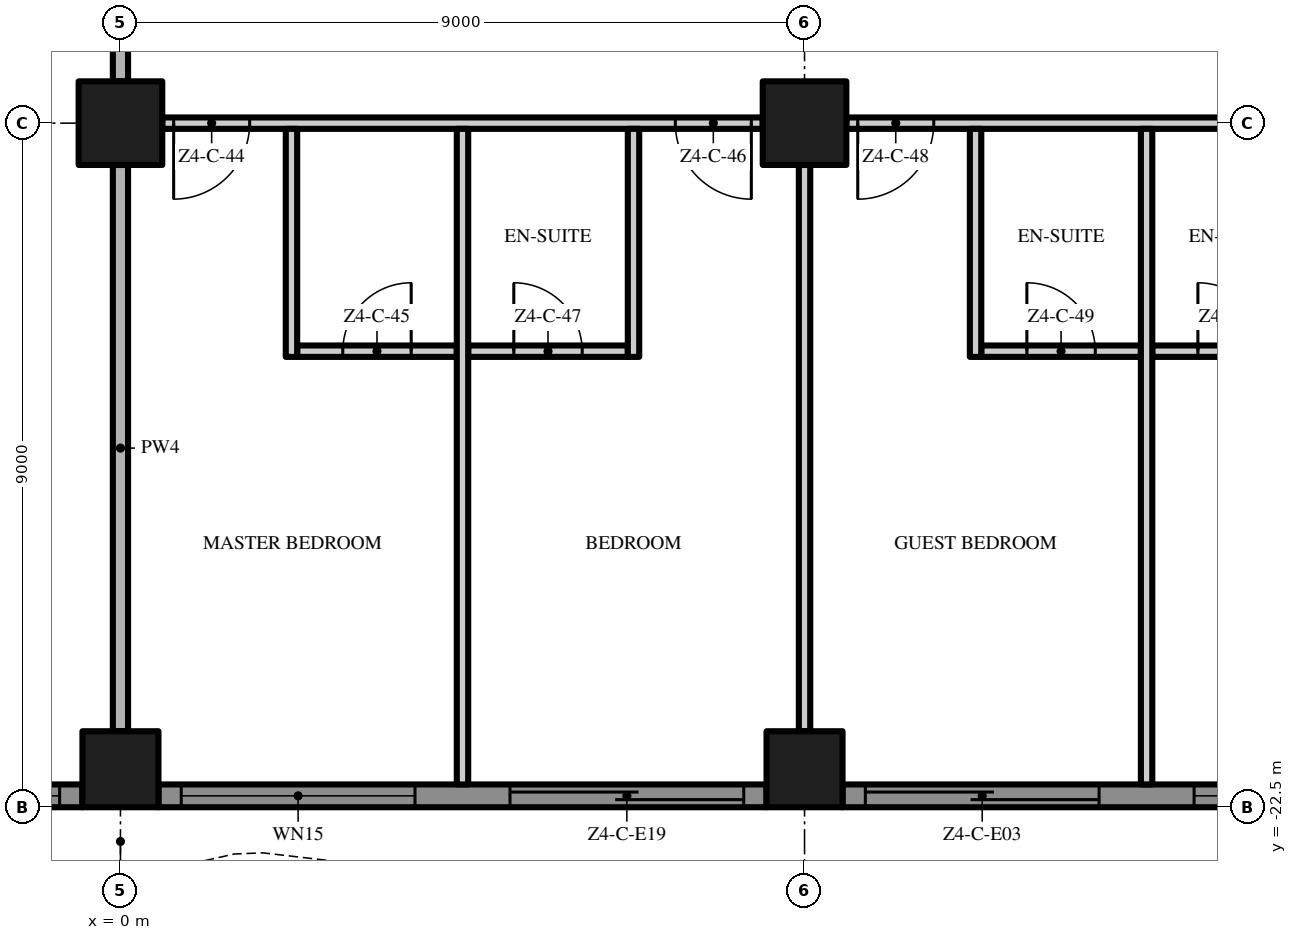
"""IFC4 building model, lengths in metres.
Left out: names, types, materials, properties, quantities, classifications, styles, units other than length and angle.
Written with IfcOpenShell. Run it as: python <this file> out.ifc"""

import sys

from ifc_helpers import new_model, si_unit, direction, frame, frame_2d, origin, origin_2d, place, context, subcontext, project, spatial, polyline, rectangle, outline, extrude, element, fill, save


model = new_model("IFC4")
c1 = context("Model", 3, precision=1e-05, world=origin(), true_north=direction((0.0, 1.0)))
c2 = subcontext(c1, "Body", "Model", "MODEL_VIEW")
j1 = project(units=[si_unit("LENGTHUNIT", "METRE"), si_unit("PLANEANGLEUNIT", "RADIAN")], contexts=[c1])
p1 = place(None, origin())
s1 = spatial("IfcSite", under=j1, at=p1, CompositionType="ELEMENT")
p2 = place(p1, origin())
s2 = spatial("IfcBuilding", under=s1, at=p2, CompositionType="ELEMENT")
p3 = place(p2, frame((0.0, 0.0, 214.8)))
s3 = spatial("IfcBuildingStorey", under=s2, at=p3, CompositionType="ELEMENT", Elevation=214.8)
p4 = place(p3, frame((0.0, -13.5, 0.0), z_axis=(0.0, 0.0, 1.0), x_axis=(1.0, 0.0, 0.0)))
e1 = element("IfcColumn", 1, at=p4, inside=s3, PredefinedType="COLUMN", context=c2, shape_type="SweptSolid", body=[
    extrude(rectangle(XDim=1.1, YDim=1.1, at=origin_2d()), origin(), (0.0, 0.0, 1.0), 3.5),
])
p5 = place(p3, frame((0.0, -22.0, 0.0), z_axis=(0.0, 0.0, 1.0), x_axis=(1.0, 0.0, 0.0)))
e2 = element("IfcColumn", 2, at=p5, inside=s3, PredefinedType="COLUMN", context=c2, shape_type="SweptSolid", body=[
    extrude(rectangle(XDim=1.0, YDim=1.0, at=origin_2d()), origin(), (0.0, 0.0, 1.0), 3.5),
])
p6 = place(p3, frame((9.0, -13.5, 0.0), z_axis=(0.0, 0.0, 1.0), x_axis=(1.0, 0.0, 0.0)))
e3 = element("IfcColumn", 3, at=p6, inside=s3, PredefinedType="COLUMN", context=c2, shape_type="SweptSolid", body=[
    extrude(rectangle(XDim=1.1, YDim=1.1, at=origin_2d()), origin(), (0.0, 0.0, 1.0), 3.5),
])
p7 = place(p3, frame((9.0, -22.0, 0.0), z_axis=(0.0, 0.0, 1.0), x_axis=(1.0, 0.0, 0.0)))
e4 = element("IfcColumn", 4, at=p7, inside=s3, PredefinedType="COLUMN", context=c2, shape_type="SweptSolid", body=[
    extrude(rectangle(XDim=1.0, YDim=1.0, at=origin_2d()), origin(), (0.0, 0.0, 1.0), 3.5),
])
p8 = place(p3, frame((-0.5, -22.35, 0.0), z_axis=(0.0, 0.0, 1.0), x_axis=(-1.0, 0.0, 0.0)))
e5 = element("IfcWall", 5, at=p8, inside=s3, PredefinedType="SOLIDWALL", context=c2, shape_type="SweptSolid", body=[
    extrude(rectangle(XDim=8.0, YDim=0.3, at=frame_2d((4.0, 0.0))), origin(), (0.0, 0.0, 1.0), 3.5),
])
p9 = place(p8, frame((4.625, 0.0, 0.0)))
e6 = element("IfcOpeningElement", 6, at=p9, cuts=e5, PredefinedType="OPENING", context=c2, shape_type="SweptSolid", body=[
    extrude(rectangle(XDim=3.075, YDim=2.4, at=frame_2d((1.538, 1.2))), frame((0.0, 0.16, 0.0), z_axis=(0.0, -1.0, 0.0), x_axis=(1.0, 0.0, 0.0)), (0.0, 0.0, 1.0), 0.32),
])
p10 = place(p8, frame((0.3, 0.0, 0.45)))
e7 = element("IfcOpeningElement", 7, at=p10, cuts=e5, PredefinedType="OPENING", context=c2, shape_type="SweptSolid", body=[
    extrude(rectangle(XDim=3.075, YDim=2.65, at=frame_2d((1.538, 1.325))), frame((0.0, 0.16, 0.0), z_axis=(0.0, -1.0, 0.0), x_axis=(1.0, 0.0, 0.0)), (0.0, 0.0, 1.0), 0.32),
])
p11 = place(p3, frame((8.5, -22.35, 0.0), z_axis=(0.0, 0.0, 1.0), x_axis=(-1.0, 0.0, 0.0)))
e8 = element("IfcWall", 8, at=p11, inside=s3, PredefinedType="SOLIDWALL", context=c2, shape_type="SweptSolid", body=[
    extrude(rectangle(XDim=8.0, YDim=0.3, at=frame_2d((4.0, 0.0))), origin(), (0.0, 0.0, 1.0), 3.5),
])
p12 = place(p11, frame((4.625, 0.0, 0.45)))
e9 = element("IfcOpeningElement", 9, at=p12, cuts=e8, PredefinedType="OPENING", context=c2, shape_type="SweptSolid", body=[
    extrude(rectangle(XDim=3.075, YDim=2.65, at=frame_2d((1.538, 1.325))), frame((0.0, 0.16, 0.0), z_axis=(0.0, -1.0, 0.0), x_axis=(1.0, 0.0, 0.0)), (0.0, 0.0, 1.0), 0.32),
])
p13 = place(p11, frame((0.3, 0.0, 0.0)))
e10 = element("IfcOpeningElement", 10, at=p13, cuts=e8, PredefinedType="OPENING", context=c2, shape_type="SweptSolid", body=[
    extrude(rectangle(XDim=3.075, YDim=2.4, at=frame_2d((1.538, 1.2))), frame((0.0, 0.16, 0.0), z_axis=(0.0, -1.0, 0.0), x_axis=(1.0, 0.0, 0.0)), (0.0, 0.0, 1.0), 0.32),
])
p14 = place(p3, frame((17.5, -22.35, 0.0), z_axis=(0.0, 0.0, 1.0), x_axis=(-1.0, 0.0, 0.0)))
e11 = element("IfcWall", 11, at=p14, inside=s3, PredefinedType="SOLIDWALL", context=c2, shape_type="SweptSolid", body=[
    extrude(rectangle(XDim=8.0, YDim=0.3, at=frame_2d((4.0, 0.0))), origin(), (0.0, 0.0, 1.0), 3.5),
])
p15 = place(p14, frame((4.625, 0.0, 0.0)))
e12 = element("IfcOpeningElement", 12, at=p15, cuts=e11, PredefinedType="OPENING", context=c2, shape_type="SweptSolid", body=[
    extrude(rectangle(XDim=3.075, YDim=2.4, at=frame_2d((1.538, 1.2))), frame((0.0, 0.16, 0.0), z_axis=(0.0, -1.0, 0.0), x_axis=(1.0, 0.0, 0.0)), (0.0, 0.0, 1.0), 0.32),
])
p16 = place(p14, frame((0.3, 0.0, 0.45)))
e13 = element("IfcOpeningElement", 13, at=p16, cuts=e11, PredefinedType="OPENING", context=c2, shape_type="SweptSolid", body=[
    extrude(rectangle(XDim=3.075, YDim=2.65, at=frame_2d((1.538, 1.325))), frame((0.0, 0.16, 0.0), z_axis=(0.0, -1.0, 0.0), x_axis=(1.0, 0.0, 0.0)), (0.0, 0.0, 1.0), 0.32),
])
p17 = place(p3, origin())
e14 = element("IfcWall", 14, at=p17, inside=s3, PredefinedType="USERDEFINED", context=c2, shape_type="SweptSolid", body=[
    extrude(outline(polyline([(-22.5, -25.149), (-21.0, -25.485), (-20.625, -25.5), (-19.5, -25.369), (-18.0, -24.845), (-16.5, -24.112), (-15.0, -23.451), (-13.5, -23.115), (-13.125, -23.1), (-12.0, -23.231), (-10.5, -23.755), (-9.0, -24.488), (-7.5, -25.149), (-6.0, -25.485), (-5.625, -25.5), (-4.5, -25.369), (-3.0, -24.845), (-1.5, -24.112), (0.0, -23.451), (1.5, -23.115), (1.875, -23.1), (3.0, -23.231), (4.5, -23.755), (6.0, -24.488), (7.5, -25.149), (9.0, -25.485), (9.375, -25.5), (10.5, -25.369), (12.0, -24.845), (13.5, -24.112), (15.0, -23.451), (16.5, -23.115), (16.875, -23.1), (18.0, -23.231), (19.5, -23.755), (21.0, -24.488), (22.5, -25.149), (22.601, -24.92), (21.105, -24.261), (19.596, -23.524), (18.056, -22.986), (16.885, -22.849), (16.467, -22.866), (14.921, -23.213), (13.395, -23.885), (11.904, -24.614), (10.444, -25.124), (9.365, -25.249), (9.033, -25.236), (7.579, -24.91), (6.105, -24.261), (4.596, -23.524), (3.056, -22.986), (1.885, -22.849), (1.467, -22.866), (-0.079, -23.213), (-1.605, -23.885), (-3.096, -24.614), (-4.556, -25.124), (-5.635, -25.249), (-5.967, -25.236), (-7.421, -24.91), (-8.895, -24.261), (-10.404, -23.524), (-11.944, -22.986), (-13.115, -22.849), (-13.533, -22.866), (-15.079, -23.213), (-16.605, -23.885), (-18.096, -24.614), (-19.556, -25.124), (-20.635, -25.249), (-20.967, -25.236), (-22.445, -24.905), (-22.5, -25.149)])), origin(), (0.0, 0.0, 1.0), 0.9),
])
p18 = place(p3, frame((2.325, -16.5, 0.0), z_axis=(0.0, 0.0, 1.0), x_axis=(1.0, 0.0, 0.0)))
e15 = element("IfcWall", 15, at=p18, inside=s3, PredefinedType="PARTITIONING", context=c2, shape_type="SweptSolid", body=[
    extrude(rectangle(XDim=2.1, YDim=0.15, at=frame_2d((1.05, 0.0))), origin(), (0.0, 0.0, 1.0), 3.5),
])
p19 = place(p18, frame((0.6, 0.0, 0.0)))
e16 = element("IfcOpeningElement", 16, at=p19, cuts=e15, PredefinedType="OPENING", context=c2, shape_type="SweptSolid", body=[
    extrude(rectangle(XDim=0.9, YDim=2.1, at=frame_2d((0.45, 1.05))), frame((0.0, 0.085, 0.0), z_axis=(0.0, -1.0, 0.0), x_axis=(1.0, 0.0, 0.0)), (0.0, 0.0, 1.0), 0.17),
])
p20 = place(p3, frame((4.575, -16.5, 0.0), z_axis=(0.0, 0.0, 1.0), x_axis=(1.0, 0.0, 0.0)))
e17 = element("IfcWall", 17, at=p20, inside=s3, PredefinedType="PARTITIONING", context=c2, shape_type="SweptSolid", body=[
    extrude(rectangle(XDim=2.1, YDim=0.15, at=frame_2d((1.05, 0.0))), origin(), (0.0, 0.0, 1.0), 3.5),
])
p21 = place(p20, frame((0.6, 0.0, 0.0)))
e18 = element("IfcOpeningElement", 18, at=p21, cuts=e17, PredefinedType="OPENING", context=c2, shape_type="SweptSolid", body=[
    extrude(rectangle(XDim=0.9, YDim=2.1, at=frame_2d((0.45, 1.05))), frame((0.0, 0.085, 0.0), z_axis=(0.0, -1.0, 0.0), x_axis=(1.0, 0.0, 0.0)), (0.0, 0.0, 1.0), 0.17),
])
p22 = place(p3, frame((11.325, -16.5, 0.0), z_axis=(0.0, 0.0, 1.0), x_axis=(1.0, 0.0, 0.0)))
e19 = element("IfcWall", 19, at=p22, inside=s3, PredefinedType="PARTITIONING", context=c2, shape_type="SweptSolid", body=[
    extrude(rectangle(XDim=2.1, YDim=0.15, at=frame_2d((1.05, 0.0))), origin(), (0.0, 0.0, 1.0), 3.5),
])
p23 = place(p22, frame((0.6, 0.0, 0.0)))
e20 = element("IfcOpeningElement", 20, at=p23, cuts=e19, PredefinedType="OPENING", context=c2, shape_type="SweptSolid", body=[
    extrude(rectangle(XDim=0.9, YDim=2.1, at=frame_2d((0.45, 1.05))), frame((0.0, 0.085, 0.0), z_axis=(0.0, -1.0, 0.0), x_axis=(1.0, 0.0, 0.0)), (0.0, 0.0, 1.0), 0.17),
])
p24 = place(p3, frame((13.575, -16.5, 0.0), z_axis=(0.0, 0.0, 1.0), x_axis=(1.0, 0.0, 0.0)))
e21 = element("IfcWall", 21, at=p24, inside=s3, PredefinedType="PARTITIONING", context=c2, shape_type="SweptSolid", body=[
    extrude(rectangle(XDim=2.1, YDim=0.15, at=frame_2d((1.05, 0.0))), origin(), (0.0, 0.0, 1.0), 3.5),
])
p25 = place(p24, frame((0.6, 0.0, 0.0)))
e22 = element("IfcOpeningElement", 22, at=p25, cuts=e21, PredefinedType="OPENING", context=c2, shape_type="SweptSolid", body=[
    extrude(rectangle(XDim=0.9, YDim=2.1, at=frame_2d((0.45, 1.05))), frame((0.0, 0.085, 0.0), z_axis=(0.0, -1.0, 0.0), x_axis=(1.0, 0.0, 0.0)), (0.0, 0.0, 1.0), 0.17),
])
p26 = place(p3, frame((8.45, -13.5, 0.0), z_axis=(0.0, 0.0, 1.0), x_axis=(-1.0, 0.0, 0.0)))
e23 = element("IfcWall", 23, at=p26, inside=s3, PredefinedType="PARTITIONING", context=c2, shape_type="SweptSolid", body=[
    extrude(rectangle(XDim=7.9, YDim=0.15, at=frame_2d((3.95, 0.0))), origin(), (0.0, 0.0, 1.0), 3.5),
])
p27 = place(p26, frame((6.75, 0.0, 0.0)))
e24 = element("IfcOpeningElement", 24, at=p27, cuts=e23, PredefinedType="OPENING", context=c2, shape_type="SweptSolid", body=[
    extrude(rectangle(XDim=1.0, YDim=2.4, at=frame_2d((0.5, 1.2))), frame((0.0, 0.085, 0.0), z_axis=(0.0, -1.0, 0.0), x_axis=(1.0, 0.0, 0.0)), (0.0, 0.0, 1.0), 0.17),
])
p28 = place(p26, frame((0.15, 0.0, 0.0)))
e25 = element("IfcOpeningElement", 25, at=p28, cuts=e23, PredefinedType="OPENING", context=c2, shape_type="SweptSolid", body=[
    extrude(rectangle(XDim=1.0, YDim=2.4, at=frame_2d((0.5, 1.2))), frame((0.0, 0.085, 0.0), z_axis=(0.0, -1.0, 0.0), x_axis=(1.0, 0.0, 0.0)), (0.0, 0.0, 1.0), 0.17),
])
p29 = place(p3, frame((17.45, -13.5, 0.0), z_axis=(0.0, 0.0, 1.0), x_axis=(-1.0, 0.0, 0.0)))
e26 = element("IfcWall", 26, at=p29, inside=s3, PredefinedType="PARTITIONING", context=c2, shape_type="SweptSolid", body=[
    extrude(rectangle(XDim=7.9, YDim=0.15, at=frame_2d((3.95, 0.0))), origin(), (0.0, 0.0, 1.0), 3.5),
])
p30 = place(p29, frame((6.75, 0.0, 0.0)))
e27 = element("IfcOpeningElement", 27, at=p30, cuts=e26, PredefinedType="OPENING", context=c2, shape_type="SweptSolid", body=[
    extrude(rectangle(XDim=1.0, YDim=2.4, at=frame_2d((0.5, 1.2))), frame((0.0, 0.085, 0.0), z_axis=(0.0, -1.0, 0.0), x_axis=(1.0, 0.0, 0.0)), (0.0, 0.0, 1.0), 0.17),
])
p31 = place(p29, frame((0.15, 0.0, 0.0)))
e28 = element("IfcOpeningElement", 28, at=p31, cuts=e26, PredefinedType="OPENING", context=c2, shape_type="SweptSolid", body=[
    extrude(rectangle(XDim=1.0, YDim=2.4, at=frame_2d((0.5, 1.2))), frame((0.0, 0.085, 0.0), z_axis=(0.0, -1.0, 0.0), x_axis=(1.0, 0.0, 0.0)), (0.0, 0.0, 1.0), 0.17),
])
p32 = place(p3, frame((0.0, -21.5, 0.0), z_axis=(0.0, 0.0, 1.0), x_axis=(0.0, 1.0, 0.0)))
e29 = element("IfcWall", 29, at=p32, inside=s3, PredefinedType="PARTITIONING", context=c2, shape_type="SweptSolid", body=[
    extrude(rectangle(XDim=7.45, YDim=0.2, at=frame_2d((3.725, 0.0))), origin(), (0.0, 0.0, 1.0), 3.5),
])
p33 = place(p3, frame((0.0, -12.95, 0.0), z_axis=(0.0, 0.0, 1.0), x_axis=(0.0, 1.0, 0.0)))
e30 = element("IfcWall", 30, at=p33, inside=s3, PredefinedType="PARTITIONING", context=c2, shape_type="SweptSolid", body=[
    extrude(rectangle(XDim=7.9, YDim=0.2, at=frame_2d((3.95, 0.0))), origin(), (0.0, 0.0, 1.0), 3.5),
])
p34 = place(p3, frame((2.25, -16.575, 0.0), z_axis=(0.0, 0.0, 1.0), x_axis=(0.0, 1.0, 0.0)))
e31 = element("IfcWall", 31, at=p34, inside=s3, PredefinedType="PARTITIONING", context=c2, shape_type="SweptSolid", body=[
    extrude(rectangle(XDim=3.0, YDim=0.15, at=frame_2d((1.5, 0.0))), origin(), (0.0, 0.0, 1.0), 3.5),
])
p35 = place(p3, frame((4.5, -22.2, 0.0), z_axis=(0.0, 0.0, 1.0), x_axis=(0.0, 1.0, 0.0)))
e32 = element("IfcWall", 32, at=p35, inside=s3, PredefinedType="PARTITIONING", context=c2, shape_type="SweptSolid", body=[
    extrude(rectangle(XDim=8.625, YDim=0.15, at=frame_2d((4.312, 0.0))), origin(), (0.0, 0.0, 1.0), 3.5),
])
p36 = place(p3, frame((6.75, -16.575, 0.0), z_axis=(0.0, 0.0, 1.0), x_axis=(0.0, 1.0, 0.0)))
e33 = element("IfcWall", 33, at=p36, inside=s3, PredefinedType="PARTITIONING", context=c2, shape_type="SweptSolid", body=[
    extrude(rectangle(XDim=3.0, YDim=0.15, at=frame_2d((1.5, 0.0))), origin(), (0.0, 0.0, 1.0), 3.5),
])
p37 = place(p3, frame((9.0, -21.5, 0.0), z_axis=(0.0, 0.0, 1.0), x_axis=(0.0, 1.0, 0.0)))
e34 = element("IfcWall", 34, at=p37, inside=s3, PredefinedType="PARTITIONING", context=c2, shape_type="SweptSolid", body=[
    extrude(rectangle(XDim=7.45, YDim=0.15, at=frame_2d((3.725, 0.0))), origin(), (0.0, 0.0, 1.0), 3.5),
])
p38 = place(p3, frame((11.25, -16.575, 0.0), z_axis=(0.0, 0.0, 1.0), x_axis=(0.0, 1.0, 0.0)))
e35 = element("IfcWall", 35, at=p38, inside=s3, PredefinedType="PARTITIONING", context=c2, shape_type="SweptSolid", body=[
    extrude(rectangle(XDim=3.0, YDim=0.15, at=frame_2d((1.5, 0.0))), origin(), (0.0, 0.0, 1.0), 3.5),
])
p39 = place(p3, frame((13.5, -22.2, 0.0), z_axis=(0.0, 0.0, 1.0), x_axis=(0.0, 1.0, 0.0)))
e36 = element("IfcWall", 36, at=p39, inside=s3, PredefinedType="PARTITIONING", context=c2, shape_type="SweptSolid", body=[
    extrude(rectangle(XDim=8.625, YDim=0.15, at=frame_2d((4.312, 0.0))), origin(), (0.0, 0.0, 1.0), 3.5),
])
p40 = place(p10, origin())
e37 = element("IfcWindow", 37, at=p40, inside=s3, PartitioningType="SINGLE_PANEL", PredefinedType="WINDOW", context=c2, shape_type="SweptSolid", body=[
    extrude(rectangle(XDim=3.075, YDim=2.65, at=frame_2d((1.538, 1.325))), frame((0.0, 0.03, 0.0), z_axis=(0.0, -1.0, 0.0), x_axis=(1.0, 0.0, 0.0)), (0.0, 0.0, 1.0), 0.06),
])
fill(e7, e37)
p41 = place(p12, origin())
e38 = element("IfcWindow", 38, at=p41, inside=s3, PartitioningType="SINGLE_PANEL", PredefinedType="WINDOW", context=c2, shape_type="SweptSolid", body=[
    extrude(rectangle(XDim=3.075, YDim=2.65, at=frame_2d((1.538, 1.325))), frame((0.0, 0.03, 0.0), z_axis=(0.0, -1.0, 0.0), x_axis=(1.0, 0.0, 0.0)), (0.0, 0.0, 1.0), 0.06),
])
fill(e9, e38)
p42 = place(p13, origin())
e39 = element("IfcDoor", 39, at=p42, inside=s3, OperationType="SINGLE_SWING_LEFT", PredefinedType="DOOR", context=c2, shape_type="SweptSolid", body=[
    extrude(rectangle(XDim=3.075, YDim=2.4, at=frame_2d((1.538, 1.2))), frame((0.0, 0.025, 0.0), z_axis=(0.0, -1.0, 0.0), x_axis=(1.0, 0.0, 0.0)), (0.0, 0.0, 1.0), 0.05),
])
fill(e10, e39)
p43 = place(p15, origin())
e40 = element("IfcDoor", 40, at=p43, inside=s3, OperationType="SINGLE_SWING_LEFT", PredefinedType="DOOR", context=c2, shape_type="SweptSolid", body=[
    extrude(rectangle(XDim=3.075, YDim=2.4, at=frame_2d((1.538, 1.2))), frame((0.0, 0.025, 0.0), z_axis=(0.0, -1.0, 0.0), x_axis=(1.0, 0.0, 0.0)), (0.0, 0.0, 1.0), 0.05),
])
fill(e12, e40)
p44 = place(p16, origin())
e41 = element("IfcWindow", 41, at=p44, inside=s3, PartitioningType="SINGLE_PANEL", PredefinedType="WINDOW", context=c2, shape_type="SweptSolid", body=[
    extrude(rectangle(XDim=3.075, YDim=2.65, at=frame_2d((1.538, 1.325))), frame((0.0, 0.03, 0.0), z_axis=(0.0, -1.0, 0.0), x_axis=(1.0, 0.0, 0.0)), (0.0, 0.0, 1.0), 0.06),
])
fill(e13, e41)
p45 = place(p27, origin())
e42 = element("IfcDoor", 42, at=p45, inside=s3, OperationType="SINGLE_SWING_RIGHT", PredefinedType="DOOR", context=c2, shape_type="SweptSolid", body=[
    extrude(rectangle(XDim=1.0, YDim=2.4, at=frame_2d((0.5, 1.2))), frame((0.0, 0.025, 0.0), z_axis=(0.0, -1.0, 0.0), x_axis=(1.0, 0.0, 0.0)), (0.0, 0.0, 1.0), 0.05),
])
fill(e24, e42)
p46 = place(p19, origin())
e43 = element("IfcDoor", 43, at=p46, inside=s3, OperationType="SINGLE_SWING_RIGHT", PredefinedType="DOOR", context=c2, shape_type="SweptSolid", body=[
    extrude(rectangle(XDim=0.9, YDim=2.1, at=frame_2d((0.45, 1.05))), frame((0.0, 0.025, 0.0), z_axis=(0.0, -1.0, 0.0), x_axis=(1.0, 0.0, 0.0)), (0.0, 0.0, 1.0), 0.05),
])
fill(e16, e43)
p47 = place(p28, origin())
e44 = element("IfcDoor", 44, at=p47, inside=s3, OperationType="SINGLE_SWING_LEFT", PredefinedType="DOOR", context=c2, shape_type="SweptSolid", body=[
    extrude(rectangle(XDim=1.0, YDim=2.4, at=frame_2d((0.5, 1.2))), frame((0.0, 0.025, 0.0), z_axis=(0.0, -1.0, 0.0), x_axis=(1.0, 0.0, 0.0)), (0.0, 0.0, 1.0), 0.05),
])
fill(e25, e44)
p48 = place(p21, origin())
e45 = element("IfcDoor", 45, at=p48, inside=s3, OperationType="SINGLE_SWING_LEFT", PredefinedType="DOOR", context=c2, shape_type="SweptSolid", body=[
    extrude(rectangle(XDim=0.9, YDim=2.1, at=frame_2d((0.45, 1.05))), frame((0.0, 0.025, 0.0), z_axis=(0.0, -1.0, 0.0), x_axis=(1.0, 0.0, 0.0)), (0.0, 0.0, 1.0), 0.05),
])
fill(e18, e45)
p49 = place(p30, origin())
e46 = element("IfcDoor", 46, at=p49, inside=s3, OperationType="SINGLE_SWING_RIGHT", PredefinedType="DOOR", context=c2, shape_type="SweptSolid", body=[
    extrude(rectangle(XDim=1.0, YDim=2.4, at=frame_2d((0.5, 1.2))), frame((0.0, 0.025, 0.0), z_axis=(0.0, -1.0, 0.0), x_axis=(1.0, 0.0, 0.0)), (0.0, 0.0, 1.0), 0.05),
])
fill(e27, e46)
p50 = place(p23, origin())
e47 = element("IfcDoor", 47, at=p50, inside=s3, OperationType="SINGLE_SWING_LEFT", PredefinedType="DOOR", context=c2, shape_type="SweptSolid", body=[
    extrude(rectangle(XDim=0.9, YDim=2.1, at=frame_2d((0.45, 1.05))), frame((0.0, 0.025, 0.0), z_axis=(0.0, -1.0, 0.0), x_axis=(1.0, 0.0, 0.0)), (0.0, 0.0, 1.0), 0.05),
])
fill(e20, e47)
p51 = place(p25, origin())
e48 = element("IfcDoor", 48, at=p51, inside=s3, OperationType="SINGLE_SWING_LEFT", PredefinedType="DOOR", context=c2, shape_type="SweptSolid", body=[
    extrude(rectangle(XDim=0.9, YDim=2.1, at=frame_2d((0.45, 1.05))), frame((0.0, 0.025, 0.0), z_axis=(0.0, -1.0, 0.0), x_axis=(1.0, 0.0, 0.0)), (0.0, 0.0, 1.0), 0.05),
])
fill(e22, e48)
save(model, sys.argv[1])
